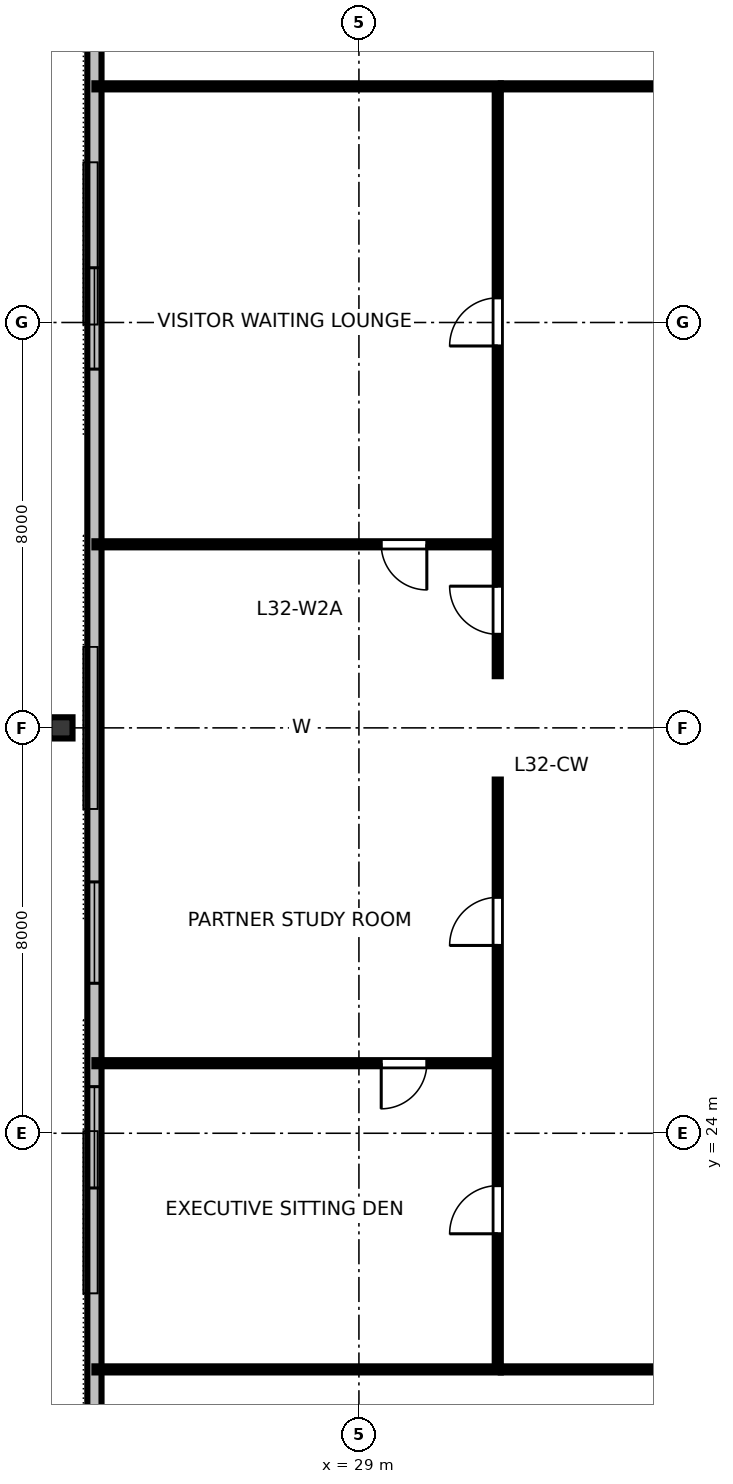
"""IFC4 building model, lengths in metres.
Left out: names, types, materials, properties, quantities, classifications, styles, units other than length and angle.
Written with IfcOpenShell. Run it as: python <this file> out.ifc"""

import sys

from ifc_helpers import new_model, si_unit, direction, frame, frame_2d, origin, origin_2d, place, context, subcontext, project, spatial, rectangle, i_section, extrude, element, fill, save


model = new_model("IFC4")
c1 = context("Model", 3, precision=1e-05, world=origin(), true_north=direction((0.0, 1.0)))
c2 = subcontext(c1, "Body", "Model", "MODEL_VIEW")
j1 = project(units=[si_unit("LENGTHUNIT", "METRE"), si_unit("PLANEANGLEUNIT", "RADIAN")], contexts=[c1])
p1 = place(None, origin())
s1 = spatial("IfcSite", under=j1, at=p1, CompositionType="ELEMENT")
p2 = place(p1, origin())
s2 = spatial("IfcBuilding", under=s1, at=p2, CompositionType="ELEMENT")
p3 = place(p2, frame((0.0, 0.0, 124.0)))
s3 = spatial("IfcBuildingStorey", under=s2, at=p3, CompositionType="ELEMENT", Elevation=124.0)
p4 = place(p3, frame((23.12, 32.0, 0.0), z_axis=(-0.089001216718, 0.0, 0.996031517284), x_axis=(0.996031517284, 0.0, 0.089001216718)))
e1 = element("IfcColumn", 1, at=p4, inside=s3, PredefinedType="COLUMN", context=c2, shape_type="SweptSolid", body=[
    extrude(i_section(OverallWidth=0.418, OverallDepth=0.455, WebThickness=0.042, FlangeThickness=0.068, FilletRadius=0.025, at=origin_2d()), origin(), (0.0, 0.0, 1.0), 3.371),
])
p5 = place(p3, frame((23.78, 47.24, 0.0), z_axis=(0.0, 0.0, 1.0), x_axis=(0.0, -1.0, 0.0)))
e2 = element("IfcWall", 2, at=p5, inside=s3, PredefinedType="STANDARD", context=c2, shape_type="SweptSolid", body=[
    extrude(rectangle(XDim=30.48, YDim=0.28, at=frame_2d((15.24, 0.0))), origin(), (0.0, 0.0, 1.0), 3.36),
])
p6 = place(p5, frame((6.16, 0.0, 0.8)))
e3 = element("IfcOpeningElement", 3, at=p6, cuts=e2, PredefinedType="OPENING", context=c2, shape_type="SweptSolid", body=[
    extrude(rectangle(XDim=2.0, YDim=1.95, at=frame_2d((1.0, 0.975))), frame((0.0, 0.15, 0.0), z_axis=(0.0, -1.0, 0.0), x_axis=(1.0, 0.0, 0.0)), (0.0, 0.0, 1.0), 0.3),
])
p7 = place(p5, frame((18.28, 0.0, 0.8)))
e4 = element("IfcOpeningElement", 4, at=p7, cuts=e2, PredefinedType="OPENING", context=c2, shape_type="SweptSolid", body=[
    extrude(rectangle(XDim=2.0, YDim=1.95, at=frame_2d((1.0, 0.975))), frame((0.0, 0.15, 0.0), z_axis=(0.0, -1.0, 0.0), x_axis=(1.0, 0.0, 0.0)), (0.0, 0.0, 1.0), 0.3),
])
p8 = place(p5, frame((22.32, 0.0, 0.8)))
e5 = element("IfcOpeningElement", 5, at=p8, cuts=e2, PredefinedType="OPENING", context=c2, shape_type="SweptSolid", body=[
    extrude(rectangle(XDim=2.0, YDim=1.95, at=frame_2d((1.0, 0.975))), frame((0.0, 0.15, 0.0), z_axis=(0.0, -1.0, 0.0), x_axis=(1.0, 0.0, 0.0)), (0.0, 0.0, 1.0), 0.3),
])
p9 = place(p3, frame((31.8, 19.34, 0.0), z_axis=(0.0, 0.0, 1.0), x_axis=(1.0, 0.0, 0.0)))
e6 = element("IfcWall", 6, at=p9, inside=s3, PredefinedType="PARTITIONING", context=c2, shape_type="SweptSolid", body=[
    extrude(rectangle(XDim=28.4, YDim=0.12, at=frame_2d((14.2, 0.0))), origin(), (0.0, 0.0, 1.0), 2.64),
])
p10 = place(p9, frame((7.878, 0.0, 0.0)))
e7 = element("IfcOpeningElement", 7, at=p10, cuts=e6, PredefinedType="OPENING", context=c2, shape_type="SweptSolid", body=[
    extrude(rectangle(XDim=0.95, YDim=2.15, at=frame_2d((0.475, 1.075))), frame((0.0, 0.07, 0.0), z_axis=(0.0, -1.0, 0.0), x_axis=(1.0, 0.0, 0.0)), (0.0, 0.0, 1.0), 0.14),
])
p11 = place(p9, frame((21.938, 0.0, 0.0)))
e8 = element("IfcOpeningElement", 8, at=p11, cuts=e6, PredefinedType="OPENING", context=c2, shape_type="SweptSolid", body=[
    extrude(rectangle(XDim=0.95, YDim=2.15, at=frame_2d((0.475, 1.075))), frame((0.0, 0.07, 0.0), z_axis=(0.0, -1.0, 0.0), x_axis=(1.0, 0.0, 0.0)), (0.0, 0.0, 1.0), 0.14),
])
p12 = place(p3, frame((31.8, 44.66, 0.0), z_axis=(0.0, 0.0, 1.0), x_axis=(1.0, 0.0, 0.0)))
e9 = element("IfcWall", 9, at=p12, inside=s3, PredefinedType="PARTITIONING", context=c2, shape_type="SweptSolid", body=[
    extrude(rectangle(XDim=28.4, YDim=0.12, at=frame_2d((14.2, 0.0))), origin(), (0.0, 0.0, 1.0), 2.64),
])
p13 = place(p12, frame((4.747, 0.0, 0.0)))
e10 = element("IfcOpeningElement", 10, at=p13, cuts=e9, PredefinedType="OPENING", context=c2, shape_type="SweptSolid", body=[
    extrude(rectangle(XDim=0.95, YDim=2.15, at=frame_2d((0.475, 1.075))), frame((0.0, 0.07, 0.0), z_axis=(0.0, -1.0, 0.0), x_axis=(1.0, 0.0, 0.0)), (0.0, 0.0, 1.0), 0.14),
])
p14 = place(p12, frame((18.807, 0.0, 0.0)))
e11 = element("IfcOpeningElement", 11, at=p14, cuts=e9, PredefinedType="OPENING", context=c2, shape_type="SweptSolid", body=[
    extrude(rectangle(XDim=0.95, YDim=2.15, at=frame_2d((0.475, 1.075))), frame((0.0, 0.07, 0.0), z_axis=(0.0, -1.0, 0.0), x_axis=(1.0, 0.0, 0.0)), (0.0, 0.0, 1.0), 0.14),
])
p15 = place(p3, frame((31.74, 25.383, 0.0), z_axis=(0.0, 0.0, 1.0), x_axis=(-1.0, 0.0, 0.0)))
e12 = element("IfcWall", 12, at=p15, inside=s3, PredefinedType="PARTITIONING", context=c2, shape_type="SweptSolid", body=[
    extrude(rectangle(XDim=7.96, YDim=0.12, at=frame_2d((3.98, 0.0))), origin(), (0.0, 0.0, 1.0), 2.64),
])
p16 = place(p15, frame((1.4, 0.0, 0.0)))
e13 = element("IfcOpeningElement", 13, at=p16, cuts=e12, PredefinedType="OPENING", context=c2, shape_type="SweptSolid", body=[
    extrude(rectangle(XDim=0.9, YDim=2.15, at=frame_2d((0.45, 1.075))), frame((0.0, 0.07, 0.0), z_axis=(0.0, -1.0, 0.0), x_axis=(1.0, 0.0, 0.0)), (0.0, 0.0, 1.0), 0.14),
])
p17 = place(p3, frame((31.74, 35.623, 0.0), z_axis=(0.0, 0.0, 1.0), x_axis=(-1.0, 0.0, 0.0)))
e14 = element("IfcWall", 14, at=p17, inside=s3, PredefinedType="PARTITIONING", context=c2, shape_type="SweptSolid", body=[
    extrude(rectangle(XDim=7.96, YDim=0.12, at=frame_2d((3.98, 0.0))), origin(), (0.0, 0.0, 1.0), 2.64),
])
p18 = place(p17, frame((1.4, 0.0, 0.0)))
e15 = element("IfcOpeningElement", 15, at=p18, cuts=e14, PredefinedType="OPENING", context=c2, shape_type="SweptSolid", body=[
    extrude(rectangle(XDim=0.9, YDim=2.15, at=frame_2d((0.45, 1.075))), frame((0.0, 0.07, 0.0), z_axis=(0.0, -1.0, 0.0), x_axis=(1.0, 0.0, 0.0)), (0.0, 0.0, 1.0), 0.14),
])
p19 = place(p3, frame((31.74, 19.4, 0.0), z_axis=(0.0, 0.0, 1.0), x_axis=(0.0, 1.0, 0.0)))
e16 = element("IfcWall", 16, at=p19, inside=s3, PredefinedType="PARTITIONING", context=c2, shape_type="SweptSolid", body=[
    extrude(rectangle(XDim=11.58, YDim=0.12, at=frame_2d((5.79, 0.0))), origin(), (0.0, 0.0, 1.0), 2.64),
])
p20 = place(p19, frame((2.616, 0.0, 0.0)))
e17 = element("IfcOpeningElement", 17, at=p20, cuts=e16, PredefinedType="OPENING", context=c2, shape_type="SweptSolid", body=[
    extrude(rectangle(XDim=0.95, YDim=2.15, at=frame_2d((0.475, 1.075))), frame((0.0, 0.07, 0.0), z_axis=(0.0, -1.0, 0.0), x_axis=(1.0, 0.0, 0.0)), (0.0, 0.0, 1.0), 0.14),
])
p21 = place(p19, frame((8.306, 0.0, 0.0)))
e18 = element("IfcOpeningElement", 18, at=p21, cuts=e16, PredefinedType="OPENING", context=c2, shape_type="SweptSolid", body=[
    extrude(rectangle(XDim=0.95, YDim=2.15, at=frame_2d((0.475, 1.075))), frame((0.0, 0.07, 0.0), z_axis=(0.0, -1.0, 0.0), x_axis=(1.0, 0.0, 0.0)), (0.0, 0.0, 1.0), 0.14),
])
p22 = place(p3, frame((31.74, 33.02, 0.0), z_axis=(0.0, 0.0, 1.0), x_axis=(0.0, 1.0, 0.0)))
e19 = element("IfcWall", 19, at=p22, inside=s3, PredefinedType="PARTITIONING", context=c2, shape_type="SweptSolid", body=[
    extrude(rectangle(XDim=11.58, YDim=0.12, at=frame_2d((5.79, 0.0))), origin(), (0.0, 0.0, 1.0), 2.64),
])
p23 = place(p22, frame((0.826, 0.0, 0.0)))
e20 = element("IfcOpeningElement", 20, at=p23, cuts=e19, PredefinedType="OPENING", context=c2, shape_type="SweptSolid", body=[
    extrude(rectangle(XDim=0.95, YDim=2.15, at=frame_2d((0.475, 1.075))), frame((0.0, 0.07, 0.0), z_axis=(0.0, -1.0, 0.0), x_axis=(1.0, 0.0, 0.0)), (0.0, 0.0, 1.0), 0.14),
])
p24 = place(p22, frame((6.516, 0.0, 0.0)))
e21 = element("IfcOpeningElement", 21, at=p24, cuts=e19, PredefinedType="OPENING", context=c2, shape_type="SweptSolid", body=[
    extrude(rectangle(XDim=0.95, YDim=2.15, at=frame_2d((0.475, 1.075))), frame((0.0, 0.07, 0.0), z_axis=(0.0, -1.0, 0.0), x_axis=(1.0, 0.0, 0.0)), (0.0, 0.0, 1.0), 0.14),
])
for number, where, z_axis, x_axis in (
    (22, (31.8, 19.34, 0.0), (0.0, 0.0, 1.0), (-1.0, 0.0, 0.0)),
    (23, (31.8, 44.66, 0.0), (0.0, 0.0, 1.0), (-1.0, 0.0, 0.0)),
):
    element("IfcWall", number, at=place(p3, frame(where, z_axis=z_axis, x_axis=x_axis)), inside=s3, PredefinedType="PARTITIONING", context=c2, shape_type="SweptSolid", body=[
        extrude(rectangle(XDim=8.02, YDim=0.12, at=frame_2d((4.01, 0.0))), origin(), (0.0, 0.0, 1.0), 2.64),
    ])
p25 = place(p6, origin())
e24 = element("IfcWindow", 24, at=p25, inside=s3, PartitioningType="SINGLE_PANEL", PredefinedType="WINDOW", context=c2, shape_type="SweptSolid", body=[
    extrude(rectangle(XDim=2.0, YDim=1.95, at=frame_2d((1.0, 0.975))), frame((0.0, 0.03, 0.0), z_axis=(0.0, -1.0, 0.0), x_axis=(1.0, 0.0, 0.0)), (0.0, 0.0, 1.0), 0.06),
])
fill(e3, e24)
p26 = place(p7, origin())
e25 = element("IfcWindow", 25, at=p26, inside=s3, PartitioningType="SINGLE_PANEL", PredefinedType="WINDOW", context=c2, shape_type="SweptSolid", body=[
    extrude(rectangle(XDim=2.0, YDim=1.95, at=frame_2d((1.0, 0.975))), frame((0.0, 0.03, 0.0), z_axis=(0.0, -1.0, 0.0), x_axis=(1.0, 0.0, 0.0)), (0.0, 0.0, 1.0), 0.06),
])
fill(e4, e25)
p27 = place(p8, origin())
e26 = element("IfcWindow", 26, at=p27, inside=s3, PartitioningType="SINGLE_PANEL", PredefinedType="WINDOW", context=c2, shape_type="SweptSolid", body=[
    extrude(rectangle(XDim=2.0, YDim=1.95, at=frame_2d((1.0, 0.975))), frame((0.0, 0.03, 0.0), z_axis=(0.0, -1.0, 0.0), x_axis=(1.0, 0.0, 0.0)), (0.0, 0.0, 1.0), 0.06),
])
fill(e5, e26)
p28 = place(p16, origin())
e27 = element("IfcDoor", 27, at=p28, inside=s3, OperationType="SINGLE_SWING_RIGHT", PredefinedType="DOOR", context=c2, shape_type="SweptSolid", body=[
    extrude(rectangle(XDim=0.9, YDim=2.15, at=frame_2d((0.45, 1.075))), frame((0.0, 0.025, 0.0), z_axis=(0.0, -1.0, 0.0), x_axis=(1.0, 0.0, 0.0)), (0.0, 0.0, 1.0), 0.05),
])
fill(e13, e27)
p29 = place(p18, origin())
e28 = element("IfcDoor", 28, at=p29, inside=s3, OperationType="SINGLE_SWING_LEFT", PredefinedType="DOOR", context=c2, shape_type="SweptSolid", body=[
    extrude(rectangle(XDim=0.9, YDim=2.15, at=frame_2d((0.45, 1.075))), frame((0.0, 0.025, 0.0), z_axis=(0.0, -1.0, 0.0), x_axis=(1.0, 0.0, 0.0)), (0.0, 0.0, 1.0), 0.05),
])
fill(e15, e28)
p30 = place(p20, origin())
e29 = element("IfcDoor", 29, at=p30, inside=s3, OperationType="SINGLE_SWING_LEFT", PredefinedType="DOOR", context=c2, shape_type="SweptSolid", body=[
    extrude(rectangle(XDim=0.95, YDim=2.15, at=frame_2d((0.475, 1.075))), frame((0.0, 0.025, 0.0), z_axis=(0.0, -1.0, 0.0), x_axis=(1.0, 0.0, 0.0)), (0.0, 0.0, 1.0), 0.05),
])
fill(e17, e29)
p31 = place(p21, origin())
e30 = element("IfcDoor", 30, at=p31, inside=s3, OperationType="SINGLE_SWING_LEFT", PredefinedType="DOOR", context=c2, shape_type="SweptSolid", body=[
    extrude(rectangle(XDim=0.95, YDim=2.15, at=frame_2d((0.475, 1.075))), frame((0.0, 0.025, 0.0), z_axis=(0.0, -1.0, 0.0), x_axis=(1.0, 0.0, 0.0)), (0.0, 0.0, 1.0), 0.05),
])
fill(e18, e30)
p32 = place(p23, origin())
e31 = element("IfcDoor", 31, at=p32, inside=s3, OperationType="SINGLE_SWING_RIGHT", PredefinedType="DOOR", context=c2, shape_type="SweptSolid", body=[
    extrude(rectangle(XDim=0.95, YDim=2.15, at=frame_2d((0.475, 1.075))), frame((0.0, 0.025, 0.0), z_axis=(0.0, -1.0, 0.0), x_axis=(1.0, 0.0, 0.0)), (0.0, 0.0, 1.0), 0.05),
])
fill(e20, e31)
p33 = place(p24, origin())
e32 = element("IfcDoor", 32, at=p33, inside=s3, OperationType="SINGLE_SWING_LEFT", PredefinedType="DOOR", context=c2, shape_type="SweptSolid", body=[
    extrude(rectangle(XDim=0.95, YDim=2.15, at=frame_2d((0.475, 1.075))), frame((0.0, 0.025, 0.0), z_axis=(0.0, -1.0, 0.0), x_axis=(1.0, 0.0, 0.0)), (0.0, 0.0, 1.0), 0.05),
])
fill(e21, e32)
save(model, sys.argv[1])
